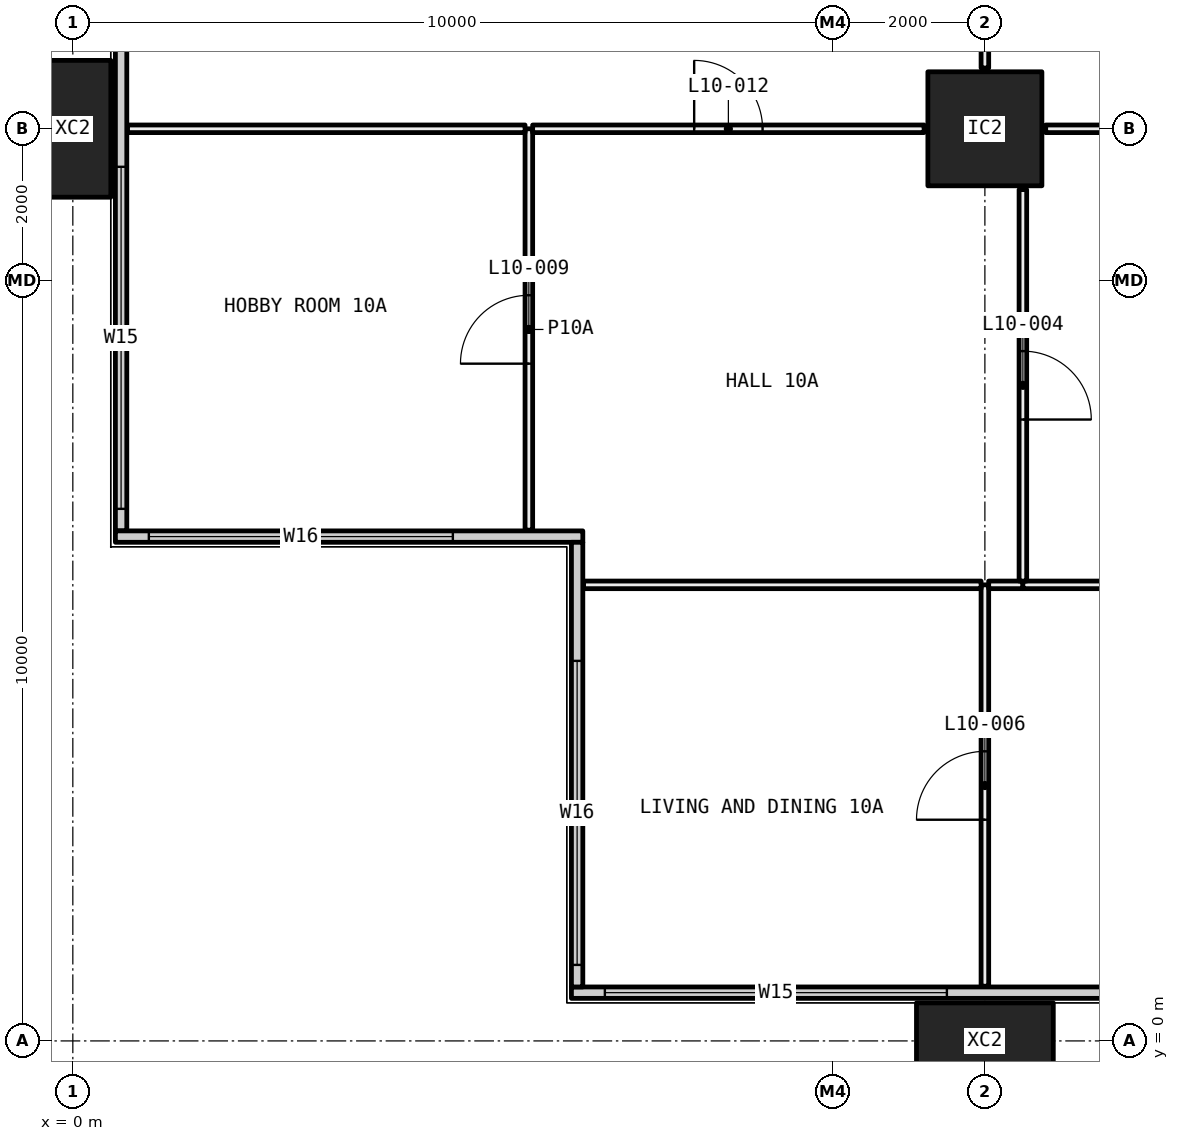
"""IFC4 building model, lengths in metres.
Left out: names, types, materials, properties, quantities, classifications, styles, units other than length and angle.
Written with IfcOpenShell. Run it as: python <this file> out.ifc"""

import sys

from ifc_helpers import new_model, si_unit, direction, frame, frame_2d, origin, origin_2d, place, context, subcontext, project, spatial, rectangle, hollow_rectangle, extrude, element, fill, save


model = new_model("IFC4")
c1 = context("Model", 3, precision=1e-05, world=origin(), true_north=direction((0.0, 1.0)))
c2 = subcontext(c1, "Body", "Model", "MODEL_VIEW")
j1 = project(units=[si_unit("LENGTHUNIT", "METRE"), si_unit("PLANEANGLEUNIT", "RADIAN")], contexts=[c1])
p1 = place(None, origin())
s1 = spatial("IfcSite", under=j1, at=p1, CompositionType="ELEMENT")
p2 = place(p1, origin())
s2 = spatial("IfcBuilding", under=s1, at=p2, CompositionType="ELEMENT")
p3 = place(p2, frame((0.0, 0.0, 47.25)))
s3 = spatial("IfcBuildingStorey", under=s2, at=p3, CompositionType="ELEMENT", Elevation=47.25)
for number, where, z_axis, x_axis in (
    (1, (0.0, 12.0, -0.4), (0.0, 0.0, 1.0), (0.0, 1.0, 0.0)),
    (2, (12.0, 0.0, -0.4), (0.0, 0.0, 1.0), (1.0, 0.0, 0.0)),
):
    element("IfcColumn", number, at=place(p3, frame(where, z_axis=z_axis, x_axis=x_axis)), inside=s3, PredefinedType="COLUMN", context=c2, shape_type="SweptSolid", body=[
        extrude(hollow_rectangle(XDim=1.8, YDim=1.0, WallThickness=0.07, at=origin_2d()), origin(), (0.0, 0.0, 1.0), 3.45),
    ])
p4 = place(p3, frame((12.0, 12.0, 0.0), z_axis=(0.0, 0.0, 1.0), x_axis=(1.0, 0.0, 0.0)))
e3 = element("IfcColumn", 3, at=p4, inside=s3, PredefinedType="COLUMN", context=c2, shape_type="SweptSolid", body=[
    extrude(hollow_rectangle(XDim=1.5, YDim=1.5, WallThickness=0.065, at=origin_2d()), origin(), (0.0, 0.0, 1.0), 3.05),
])
p5 = place(p3, frame((6.56, 0.635, 0.0), z_axis=(0.0, 0.0, 1.0), x_axis=(1.0, 0.0, 0.0)))
e4 = element("IfcWall", 4, at=p5, inside=s3, PredefinedType="ELEMENTEDWALL", context=c2, shape_type="SweptSolid", body=[
    extrude(rectangle(XDim=58.88, YDim=0.15, at=frame_2d((29.44, 0.0))), origin(), (0.0, 0.0, 1.0), 3.05),
])
p6 = place(p5, frame((0.44, 0.0, 0.45)))
e5 = element("IfcOpeningElement", 5, at=p6, cuts=e4, PredefinedType="OPENING", context=c2, shape_type="SweptSolid", body=[
    extrude(rectangle(XDim=4.5, YDim=2.55, at=frame_2d((2.25, 1.275))), frame((0.0, 0.085, 0.0), z_axis=(0.0, -1.0, 0.0), x_axis=(1.0, 0.0, 0.0)), (0.0, 0.0, 1.0), 0.17),
])
p7 = place(p5, frame((7.94, 0.0, 0.45)))
e6 = element("IfcOpeningElement", 6, at=p7, cuts=e4, PredefinedType="OPENING", context=c2, shape_type="SweptSolid", body=[
    extrude(rectangle(XDim=3.0, YDim=2.55, at=frame_2d((1.5, 1.275))), frame((0.0, 0.085, 0.0), z_axis=(0.0, -1.0, 0.0), x_axis=(1.0, 0.0, 0.0)), (0.0, 0.0, 1.0), 0.17),
])
p8 = place(p5, frame((11.94, 0.0, 0.45)))
e7 = element("IfcOpeningElement", 7, at=p8, cuts=e4, PredefinedType="OPENING", context=c2, shape_type="SweptSolid", body=[
    extrude(rectangle(XDim=3.0, YDim=2.55, at=frame_2d((1.5, 1.275))), frame((0.0, 0.085, 0.0), z_axis=(0.0, -1.0, 0.0), x_axis=(1.0, 0.0, 0.0)), (0.0, 0.0, 1.0), 0.17),
])
p9 = place(p5, frame((19.94, 0.0, 0.45)))
e8 = element("IfcOpeningElement", 8, at=p9, cuts=e4, PredefinedType="OPENING", context=c2, shape_type="SweptSolid", body=[
    extrude(rectangle(XDim=3.0, YDim=2.55, at=frame_2d((1.5, 1.275))), frame((0.0, 0.085, 0.0), z_axis=(0.0, -1.0, 0.0), x_axis=(1.0, 0.0, 0.0)), (0.0, 0.0, 1.0), 0.17),
])
p10 = place(p5, frame((23.94, 0.0, 0.45)))
e9 = element("IfcOpeningElement", 9, at=p10, cuts=e4, PredefinedType="OPENING", context=c2, shape_type="SweptSolid", body=[
    extrude(rectangle(XDim=2.0, YDim=2.55, at=frame_2d((1.0, 1.275))), frame((0.0, 0.085, 0.0), z_axis=(0.0, -1.0, 0.0), x_axis=(1.0, 0.0, 0.0)), (0.0, 0.0, 1.0), 0.17),
])
p11 = place(p5, frame((31.94, 0.0, 0.45)))
e10 = element("IfcOpeningElement", 10, at=p11, cuts=e4, PredefinedType="OPENING", context=c2, shape_type="SweptSolid", body=[
    extrude(rectangle(XDim=3.0, YDim=2.55, at=frame_2d((1.5, 1.275))), frame((0.0, 0.085, 0.0), z_axis=(0.0, -1.0, 0.0), x_axis=(1.0, 0.0, 0.0)), (0.0, 0.0, 1.0), 0.17),
])
p12 = place(p5, frame((35.94, 0.0, 0.45)))
e11 = element("IfcOpeningElement", 11, at=p12, cuts=e4, PredefinedType="OPENING", context=c2, shape_type="SweptSolid", body=[
    extrude(rectangle(XDim=3.0, YDim=2.55, at=frame_2d((1.5, 1.275))), frame((0.0, 0.085, 0.0), z_axis=(0.0, -1.0, 0.0), x_axis=(1.0, 0.0, 0.0)), (0.0, 0.0, 1.0), 0.17),
])
p13 = place(p5, frame((43.94, 0.0, 0.45)))
e12 = element("IfcOpeningElement", 12, at=p13, cuts=e4, PredefinedType="OPENING", context=c2, shape_type="SweptSolid", body=[
    extrude(rectangle(XDim=3.0, YDim=2.55, at=frame_2d((1.5, 1.275))), frame((0.0, 0.085, 0.0), z_axis=(0.0, -1.0, 0.0), x_axis=(1.0, 0.0, 0.0)), (0.0, 0.0, 1.0), 0.17),
])
p14 = place(p5, frame((47.94, 0.0, 0.45)))
e13 = element("IfcOpeningElement", 13, at=p14, cuts=e4, PredefinedType="OPENING", context=c2, shape_type="SweptSolid", body=[
    extrude(rectangle(XDim=2.0, YDim=2.55, at=frame_2d((1.0, 1.275))), frame((0.0, 0.085, 0.0), z_axis=(0.0, -1.0, 0.0), x_axis=(1.0, 0.0, 0.0)), (0.0, 0.0, 1.0), 0.17),
])
p15 = place(p5, frame((53.94, 0.0, 0.45)))
e14 = element("IfcOpeningElement", 14, at=p15, cuts=e4, PredefinedType="OPENING", context=c2, shape_type="SweptSolid", body=[
    extrude(rectangle(XDim=4.5, YDim=2.55, at=frame_2d((2.25, 1.275))), frame((0.0, 0.085, 0.0), z_axis=(0.0, -1.0, 0.0), x_axis=(1.0, 0.0, 0.0)), (0.0, 0.0, 1.0), 0.17),
])
p16 = place(p3, frame((0.635, 6.71, 0.0), z_axis=(0.0, 0.0, 1.0), x_axis=(0.0, 1.0, 0.0)))
e15 = element("IfcWall", 15, at=p16, inside=s3, PredefinedType="ELEMENTEDWALL", context=c2, shape_type="SweptSolid", body=[
    extrude(rectangle(XDim=34.58, YDim=0.15, at=frame_2d((17.29, 0.0))), origin(), (0.0, 0.0, 1.0), 3.05),
])
p17 = place(p16, frame((0.29, 0.0, 0.45)))
e16 = element("IfcOpeningElement", 16, at=p17, cuts=e15, PredefinedType="OPENING", context=c2, shape_type="SweptSolid", body=[
    extrude(rectangle(XDim=4.5, YDim=2.55, at=frame_2d((2.25, 1.275))), frame((0.0, 0.085, 0.0), z_axis=(0.0, -1.0, 0.0), x_axis=(1.0, 0.0, 0.0)), (0.0, 0.0, 1.0), 0.17),
])
p18 = place(p16, frame((7.79, 0.0, 0.45)))
e17 = element("IfcOpeningElement", 17, at=p18, cuts=e15, PredefinedType="OPENING", context=c2, shape_type="SweptSolid", body=[
    extrude(rectangle(XDim=3.0, YDim=2.55, at=frame_2d((1.5, 1.275))), frame((0.0, 0.085, 0.0), z_axis=(0.0, -1.0, 0.0), x_axis=(1.0, 0.0, 0.0)), (0.0, 0.0, 1.0), 0.17),
])
p19 = place(p16, frame((11.79, 0.0, 0.45)))
e18 = element("IfcOpeningElement", 18, at=p19, cuts=e15, PredefinedType="OPENING", context=c2, shape_type="SweptSolid", body=[
    extrude(rectangle(XDim=3.0, YDim=2.55, at=frame_2d((1.5, 1.275))), frame((0.0, 0.085, 0.0), z_axis=(0.0, -1.0, 0.0), x_axis=(1.0, 0.0, 0.0)), (0.0, 0.0, 1.0), 0.17),
])
p20 = place(p16, frame((19.79, 0.0, 0.45)))
e19 = element("IfcOpeningElement", 19, at=p20, cuts=e15, PredefinedType="OPENING", context=c2, shape_type="SweptSolid", body=[
    extrude(rectangle(XDim=3.0, YDim=2.55, at=frame_2d((1.5, 1.275))), frame((0.0, 0.085, 0.0), z_axis=(0.0, -1.0, 0.0), x_axis=(1.0, 0.0, 0.0)), (0.0, 0.0, 1.0), 0.17),
])
p21 = place(p16, frame((23.79, 0.0, 0.45)))
e20 = element("IfcOpeningElement", 20, at=p21, cuts=e15, PredefinedType="OPENING", context=c2, shape_type="SweptSolid", body=[
    extrude(rectangle(XDim=2.0, YDim=2.55, at=frame_2d((1.0, 1.275))), frame((0.0, 0.085, 0.0), z_axis=(0.0, -1.0, 0.0), x_axis=(1.0, 0.0, 0.0)), (0.0, 0.0, 1.0), 0.17),
])
p22 = place(p16, frame((29.79, 0.0, 0.45)))
e21 = element("IfcOpeningElement", 21, at=p22, cuts=e15, PredefinedType="OPENING", context=c2, shape_type="SweptSolid", body=[
    extrude(rectangle(XDim=4.5, YDim=2.55, at=frame_2d((2.25, 1.275))), frame((0.0, 0.085, 0.0), z_axis=(0.0, -1.0, 0.0), x_axis=(1.0, 0.0, 0.0)), (0.0, 0.0, 1.0), 0.17),
])
p23 = place(p3, frame((0.56, 6.635, 0.0), z_axis=(0.0, 0.0, 1.0), x_axis=(1.0, 0.0, 0.0)))
e22 = element("IfcWall", 22, at=p23, inside=s3, PredefinedType="ELEMENTEDWALL", context=c2, shape_type="SweptSolid", body=[
    extrude(rectangle(XDim=6.15, YDim=0.15, at=frame_2d((3.075, 0.0))), origin(), (0.0, 0.0, 1.0), 3.05),
])
p24 = place(p23, frame((0.44, 0.0, 0.45)))
e23 = element("IfcOpeningElement", 23, at=p24, cuts=e22, PredefinedType="OPENING", context=c2, shape_type="SweptSolid", body=[
    extrude(rectangle(XDim=4.0, YDim=2.55, at=frame_2d((2.0, 1.275))), frame((0.0, 0.085, 0.0), z_axis=(0.0, -1.0, 0.0), x_axis=(1.0, 0.0, 0.0)), (0.0, 0.0, 1.0), 0.17),
])
p25 = place(p3, frame((6.635, 0.71, 0.0), z_axis=(0.0, 0.0, 1.0), x_axis=(0.0, 1.0, 0.0)))
e24 = element("IfcWall", 24, at=p25, inside=s3, PredefinedType="ELEMENTEDWALL", context=c2, shape_type="SweptSolid", body=[
    extrude(rectangle(XDim=5.85, YDim=0.15, at=frame_2d((2.925, 0.0))), origin(), (0.0, 0.0, 1.0), 3.05),
])
p26 = place(p25, frame((0.29, 0.0, 0.45)))
e25 = element("IfcOpeningElement", 25, at=p26, cuts=e24, PredefinedType="OPENING", context=c2, shape_type="SweptSolid", body=[
    extrude(rectangle(XDim=4.0, YDim=2.55, at=frame_2d((2.0, 1.275))), frame((0.0, 0.085, 0.0), z_axis=(0.0, -1.0, 0.0), x_axis=(1.0, 0.0, 0.0)), (0.0, 0.0, 1.0), 0.17),
])
p27 = place(p3, frame((12.0, 0.72, 0.0), z_axis=(0.0, 0.0, 1.0), x_axis=(0.0, 1.0, 0.0)))
e26 = element("IfcWall", 26, at=p27, inside=s3, PredefinedType="PARTITIONING", context=c2, shape_type="SweptSolid", body=[
    extrude(rectangle(XDim=5.28, YDim=0.1, at=frame_2d((2.64, 0.0))), origin(), (0.0, 0.0, 1.0), 2.45),
])
p28 = place(p27, frame((2.19, 0.0, 0.0)))
e27 = element("IfcOpeningElement", 27, at=p28, cuts=e26, PredefinedType="OPENING", context=c2, shape_type="SweptSolid", body=[
    extrude(rectangle(XDim=0.9, YDim=2.1, at=frame_2d((0.45, 1.05))), frame((0.0, 0.06, 0.0), z_axis=(0.0, -1.0, 0.0), x_axis=(1.0, 0.0, 0.0)), (0.0, 0.0, 1.0), 0.12),
])
p29 = place(p3, frame((11.95, 6.0, 0.0), z_axis=(0.0, 0.0, 1.0), x_axis=(-1.0, 0.0, 0.0)))
e28 = element("IfcWall", 28, at=p29, inside=s3, PredefinedType="PARTITIONING", context=c2, shape_type="SweptSolid", body=[
    extrude(rectangle(XDim=5.23, YDim=0.1, at=frame_2d((2.615, 0.0))), origin(), (0.0, 0.0, 1.0), 2.45),
])
p30 = place(p3, frame((12.5, 6.0, 0.0), z_axis=(0.0, 0.0, 1.0), x_axis=(-1.0, 0.0, 0.0)))
e29 = element("IfcWall", 29, at=p30, inside=s3, PredefinedType="PARTITIONING", context=c2, shape_type="SweptSolid", body=[
    extrude(rectangle(XDim=0.45, YDim=0.1, at=frame_2d((0.225, 0.0))), origin(), (0.0, 0.0, 1.0), 2.45),
])
p31 = place(p3, frame((17.95, 6.0, 0.0), z_axis=(0.0, 0.0, 1.0), x_axis=(-1.0, 0.0, 0.0)))
e30 = element("IfcWall", 30, at=p31, inside=s3, PredefinedType="PARTITIONING", context=c2, shape_type="SweptSolid", body=[
    extrude(rectangle(XDim=5.45, YDim=0.1, at=frame_2d((2.725, 0.0))), origin(), (0.0, 0.0, 1.0), 3.05),
])
p32 = place(p31, frame((2.275, 0.0, 0.0)))
e31 = element("IfcOpeningElement", 31, at=p32, cuts=e30, PredefinedType="OPENING", context=c2, shape_type="SweptSolid", body=[
    extrude(rectangle(XDim=0.9, YDim=2.1, at=frame_2d((0.45, 1.05))), frame((0.0, 0.06, 0.0), z_axis=(0.0, -1.0, 0.0), x_axis=(1.0, 0.0, 0.0)), (0.0, 0.0, 1.0), 0.12),
])
p33 = place(p3, frame((6.0, 6.72, 0.0), z_axis=(0.0, 0.0, 1.0), x_axis=(0.0, 1.0, 0.0)))
e32 = element("IfcWall", 32, at=p33, inside=s3, PredefinedType="PARTITIONING", context=c2, shape_type="SweptSolid", body=[
    extrude(rectangle(XDim=5.28, YDim=0.1, at=frame_2d((2.64, 0.0))), origin(), (0.0, 0.0, 1.0), 2.45),
])
p34 = place(p33, frame((2.19, 0.0, 0.0)))
e33 = element("IfcOpeningElement", 33, at=p34, cuts=e32, PredefinedType="OPENING", context=c2, shape_type="SweptSolid", body=[
    extrude(rectangle(XDim=0.9, YDim=2.1, at=frame_2d((0.45, 1.05))), frame((0.0, 0.06, 0.0), z_axis=(0.0, -1.0, 0.0), x_axis=(1.0, 0.0, 0.0)), (0.0, 0.0, 1.0), 0.12),
])
p35 = place(p3, frame((5.95, 12.0, 0.0), z_axis=(0.0, 0.0, 1.0), x_axis=(-1.0, 0.0, 0.0)))
e34 = element("IfcWall", 34, at=p35, inside=s3, PredefinedType="PARTITIONING", context=c2, shape_type="SweptSolid", body=[
    extrude(rectangle(XDim=5.23, YDim=0.1, at=frame_2d((2.615, 0.0))), origin(), (0.0, 0.0, 1.0), 2.45),
])
p36 = place(p3, frame((12.5, 6.05, 0.0), z_axis=(0.0, 0.0, 1.0), x_axis=(0.0, 1.0, 0.0)))
e35 = element("IfcWall", 35, at=p36, inside=s3, PredefinedType="PARTITIONING", context=c2, shape_type="SweptSolid", body=[
    extrude(rectangle(XDim=5.15, YDim=0.1, at=frame_2d((2.575, 0.0))), origin(), (0.0, 0.0, 1.0), 3.05),
])
p37 = place(p36, frame((2.125, 0.0, 0.0)))
e36 = element("IfcOpeningElement", 36, at=p37, cuts=e35, PredefinedType="OPENING", context=c2, shape_type="SweptSolid", body=[
    extrude(rectangle(XDim=0.9, YDim=2.1, at=frame_2d((0.45, 1.05))), frame((0.0, 0.06, 0.0), z_axis=(0.0, -1.0, 0.0), x_axis=(1.0, 0.0, 0.0)), (0.0, 0.0, 1.0), 0.12),
])
p38 = place(p3, frame((11.2, 12.0, 0.0), z_axis=(0.0, 0.0, 1.0), x_axis=(-1.0, 0.0, 0.0)))
e37 = element("IfcWall", 37, at=p38, inside=s3, PredefinedType="PARTITIONING", context=c2, shape_type="SweptSolid", body=[
    extrude(rectangle(XDim=5.15, YDim=0.1, at=frame_2d((2.575, 0.0))), origin(), (0.0, 0.0, 1.0), 2.45),
])
p39 = place(p38, frame((2.125, 0.0, 0.0)))
e38 = element("IfcOpeningElement", 38, at=p39, cuts=e37, PredefinedType="OPENING", context=c2, shape_type="SweptSolid", body=[
    extrude(rectangle(XDim=0.9, YDim=2.1, at=frame_2d((0.45, 1.05))), frame((0.0, 0.06, 0.0), z_axis=(0.0, -1.0, 0.0), x_axis=(1.0, 0.0, 0.0)), (0.0, 0.0, 1.0), 0.12),
])
p40 = place(p3, frame((16.5, 12.0, 0.0), z_axis=(0.0, 0.0, 1.0), x_axis=(-1.0, 0.0, 0.0)))
e39 = element("IfcWall", 39, at=p40, inside=s3, PredefinedType="PARTITIONING", context=c2, shape_type="SweptSolid", body=[
    extrude(rectangle(XDim=3.7, YDim=0.1, at=frame_2d((1.85, 0.0))), origin(), (0.0, 0.0, 1.0), 2.45),
])
p41 = place(p40, frame((1.4, 0.0, 0.0)))
e40 = element("IfcOpeningElement", 40, at=p41, cuts=e39, PredefinedType="OPENING", context=c2, shape_type="SweptSolid", body=[
    extrude(rectangle(XDim=0.9, YDim=2.1, at=frame_2d((0.45, 1.05))), frame((0.0, 0.06, 0.0), z_axis=(0.0, -1.0, 0.0), x_axis=(1.0, 0.0, 0.0)), (0.0, 0.0, 1.0), 0.12),
])
p42 = place(p3, frame((12.0, 12.8, 0.0), z_axis=(0.0, 0.0, 1.0), x_axis=(0.0, 1.0, 0.0)))
e41 = element("IfcWall", 41, at=p42, inside=s3, PredefinedType="PARTITIONING", context=c2, shape_type="SweptSolid", body=[
    extrude(rectangle(XDim=5.1, YDim=0.1, at=frame_2d((2.55, 0.0))), origin(), (0.0, 0.0, 1.0), 3.05),
])
p43 = place(p6, origin())
e42 = element("IfcWindow", 42, at=p43, inside=s3, PartitioningType="SINGLE_PANEL", PredefinedType="WINDOW", context=c2, shape_type="SweptSolid", body=[
    extrude(rectangle(XDim=4.5, YDim=2.55, at=frame_2d((2.25, 1.275))), frame((0.0, 0.03, 0.0), z_axis=(0.0, -1.0, 0.0), x_axis=(1.0, 0.0, 0.0)), (0.0, 0.0, 1.0), 0.06),
])
fill(e5, e42)
p44 = place(p17, origin())
e43 = element("IfcWindow", 43, at=p44, inside=s3, PartitioningType="SINGLE_PANEL", PredefinedType="WINDOW", context=c2, shape_type="SweptSolid", body=[
    extrude(rectangle(XDim=4.5, YDim=2.55, at=frame_2d((2.25, 1.275))), frame((0.0, 0.03, 0.0), z_axis=(0.0, -1.0, 0.0), x_axis=(1.0, 0.0, 0.0)), (0.0, 0.0, 1.0), 0.06),
])
fill(e16, e43)
p45 = place(p24, origin())
e44 = element("IfcWindow", 44, at=p45, inside=s3, PartitioningType="SINGLE_PANEL", PredefinedType="WINDOW", context=c2, shape_type="SweptSolid", body=[
    extrude(rectangle(XDim=4.0, YDim=2.55, at=frame_2d((2.0, 1.275))), frame((0.0, 0.03, 0.0), z_axis=(0.0, -1.0, 0.0), x_axis=(1.0, 0.0, 0.0)), (0.0, 0.0, 1.0), 0.06),
])
fill(e23, e44)
p46 = place(p26, origin())
e45 = element("IfcWindow", 45, at=p46, inside=s3, PartitioningType="SINGLE_PANEL", PredefinedType="WINDOW", context=c2, shape_type="SweptSolid", body=[
    extrude(rectangle(XDim=4.0, YDim=2.55, at=frame_2d((2.0, 1.275))), frame((0.0, 0.03, 0.0), z_axis=(0.0, -1.0, 0.0), x_axis=(1.0, 0.0, 0.0)), (0.0, 0.0, 1.0), 0.06),
])
fill(e25, e45)
p47 = place(p37, frame((0.9, 0.0, 0.0), x_axis=(-1.0, 0.0, 0.0)))
e46 = element("IfcDoor", 46, at=p47, inside=s3, OperationType="SINGLE_SWING_LEFT", PredefinedType="DOOR", context=c2, shape_type="SweptSolid", body=[
    extrude(rectangle(XDim=0.9, YDim=2.1, at=frame_2d((0.45, 1.05))), frame((0.0, 0.025, 0.0), z_axis=(0.0, -1.0, 0.0), x_axis=(1.0, 0.0, 0.0)), (0.0, 0.0, 1.0), 0.05),
])
fill(e36, e46)
p48 = place(p28, origin())
e47 = element("IfcDoor", 47, at=p48, inside=s3, OperationType="SINGLE_SWING_RIGHT", PredefinedType="DOOR", context=c2, shape_type="SweptSolid", body=[
    extrude(rectangle(XDim=0.9, YDim=2.1, at=frame_2d((0.45, 1.05))), frame((0.0, 0.025, 0.0), z_axis=(0.0, -1.0, 0.0), x_axis=(1.0, 0.0, 0.0)), (0.0, 0.0, 1.0), 0.05),
])
fill(e27, e47)
p49 = place(p34, origin())
e48 = element("IfcDoor", 48, at=p49, inside=s3, OperationType="SINGLE_SWING_RIGHT", PredefinedType="DOOR", context=c2, shape_type="SweptSolid", body=[
    extrude(rectangle(XDim=0.9, YDim=2.1, at=frame_2d((0.45, 1.05))), frame((0.0, 0.025, 0.0), z_axis=(0.0, -1.0, 0.0), x_axis=(1.0, 0.0, 0.0)), (0.0, 0.0, 1.0), 0.05),
])
fill(e33, e48)
p50 = place(p39, frame((0.9, 0.0, 0.0), x_axis=(-1.0, 0.0, 0.0)))
e49 = element("IfcDoor", 49, at=p50, inside=s3, OperationType="SINGLE_SWING_RIGHT", PredefinedType="DOOR", context=c2, shape_type="SweptSolid", body=[
    extrude(rectangle(XDim=0.9, YDim=2.1, at=frame_2d((0.45, 1.05))), frame((0.0, 0.025, 0.0), z_axis=(0.0, -1.0, 0.0), x_axis=(1.0, 0.0, 0.0)), (0.0, 0.0, 1.0), 0.05),
])
fill(e38, e49)
save(model, sys.argv[1])
